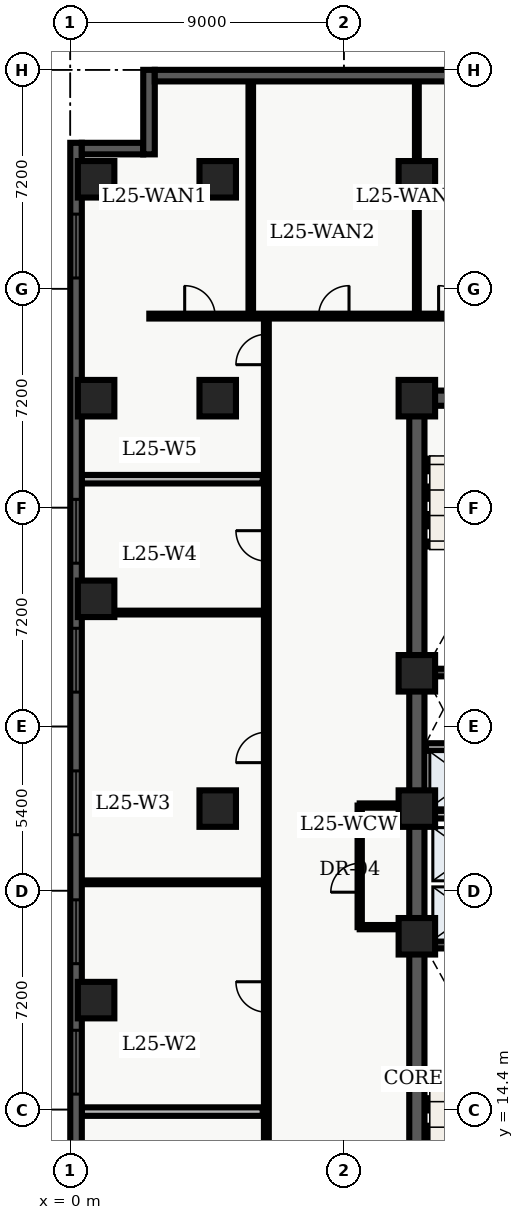
"""IFC4 building model, lengths in metres.
Left out: names, types, materials, properties, quantities, classifications, styles, units other than length and angle.
Written with IfcOpenShell. Run it as: python <this file> out.ifc"""

import sys

from ifc_helpers import new_model, entity, si_unit, converted_unit, direction, frame, origin_with_axes, origin_2d_with_axis, place, context, subcontext, project, spatial, polyline, rectangle, outline, extrude, element, fill, save


model = new_model("IFC4")
c1 = context("Model", 3, precision=1e-05, world=origin_with_axes(), true_north=direction((0.0, 1.0)))
c2 = subcontext(c1, "Body", "Model", "MODEL_VIEW")
j1 = project(units=[si_unit("LENGTHUNIT", "METRE"), converted_unit("PLANEANGLEUNIT", "DEGREE", entity("IfcPlaneAngleMeasure", 0.017), si_unit("PLANEANGLEUNIT", "RADIAN"), dimensions=[0, 0, 0, 0, 0, 0, 0])], contexts=[c1])
p1 = place(None, origin_with_axes())
s1 = spatial("IfcSite", under=j1, at=p1, CompositionType="ELEMENT")
p2 = place(p1, origin_with_axes())
s2 = spatial("IfcBuilding", under=s1, at=p2, CompositionType="ELEMENT")
p3 = place(p2, frame((0.0, 0.0, 104.7), z_axis=(0.0, 0.0, 1.0), x_axis=(1.0, 0.0, 0.0)))
s3 = spatial("IfcBuildingStorey", under=s2, at=p3, CompositionType="ELEMENT", Elevation=104.7)
p4 = place(p3, frame((11.4, 10.8, 0.0), z_axis=(0.0, 0.0, 1.0), x_axis=(0.0, 1.0, 0.0)))
e1 = element("IfcWall", 1, at=p4, inside=s3, PredefinedType="SHEAR", context=c2, shape_type="SweptSolid", body=[
    extrude(outline(polyline([(0.0, -0.25), (27.0, -0.25), (27.0, 0.25), (0.0, 0.25), (0.0, -0.25)])), origin_with_axes(), (0.0, 0.0, 1.0), 3.66),
])
p5 = place(p3, frame((11.4, 37.8, 0.0), z_axis=(0.0, 0.0, 1.0), x_axis=(1.0, 0.0, 0.0)))
e2 = element("IfcWall", 2, at=p5, inside=s3, PredefinedType="SHEAR", context=c2, shape_type="SweptSolid", body=[
    extrude(outline(polyline([(0.0, -0.25), (7.2, -0.25), (7.2, 0.25), (0.0, 0.25), (0.0, -0.25)])), origin_with_axes(), (0.0, 0.0, 1.0), 3.66),
])
p6 = place(p5, frame((2.625, 0.0, 0.0), z_axis=(0.0, 0.0, 1.0), x_axis=(1.0, 0.0, 0.0)))
e3 = element("IfcOpeningElement", 3, at=p6, cuts=e2, PredefinedType="OPENING", context=c2, shape_type="SweptSolid", body=[
    extrude(rectangle(XDim=1.05, YDim=0.52, at=origin_2d_with_axis()), origin_with_axes(), (0.0, 0.0, 1.0), 2.15),
])
for number, where, z_axis, x_axis in (
    (4, (11.65, 19.825, 0.0), (0.0, 0.0, 1.0), (1.0, 0.0, 0.0)),
    (5, (11.65, 28.775, 0.0), (0.0, 0.0, 1.0), (1.0, 0.0, 0.0)),
):
    element("IfcWall", number, at=place(p3, frame(where, z_axis=z_axis, x_axis=x_axis)), inside=s3, PredefinedType="SHEAR", context=c2, shape_type="SweptSolid", body=[
        extrude(outline(polyline([(0.0, -0.125), (6.7, -0.125), (6.7, 0.125), (0.0, 0.125), (0.0, -0.125)])), origin_with_axes(), (0.0, 0.0, 1.0), 3.66),
    ])
p7 = place(p3, frame((11.7, 24.1, 0.0), z_axis=(0.0, 0.0, 1.0), x_axis=(1.0, 0.0, 0.0)))
e6 = element("IfcWall", 6, at=p7, inside=s3, PredefinedType="SOLIDWALL", context=c2, shape_type="SweptSolid", body=[
    extrude(outline(polyline([(0.0, -0.125), (6.6, -0.125), (6.6, 0.125), (0.0, 0.125), (0.0, -0.125)])), origin_with_axes(), (0.0, 0.0, 1.0), 2.7),
])
p8 = place(p7, frame((3.75, 0.0, 0.0), z_axis=(0.0, 0.0, 1.0), x_axis=(1.0, 0.0, 0.0)))
e7 = element("IfcOpeningElement", 7, at=p8, cuts=e6, PredefinedType="OPENING", context=c2, shape_type="SweptSolid", body=[
    extrude(rectangle(XDim=0.9, YDim=0.27, at=origin_2d_with_axis()), origin_with_axes(), (0.0, 0.0, 1.0), 2.15),
])
p9 = place(p3, frame((11.7, 26.325, 0.0), z_axis=(0.0, 0.0, 1.0), x_axis=(1.0, 0.0, 0.0)))
e8 = element("IfcWall", 8, at=p9, inside=s3, PredefinedType="SOLIDWALL", context=c2, shape_type="SweptSolid", body=[
    extrude(outline(polyline([(0.0, -0.125), (6.6, -0.125), (6.6, 0.125), (0.0, 0.125), (0.0, -0.125)])), origin_with_axes(), (0.0, 0.0, 1.0), 2.7),
])
p10 = place(p9, frame((3.5, 0.0, 0.0), z_axis=(0.0, 0.0, 1.0), x_axis=(1.0, 0.0, 0.0)))
e9 = element("IfcOpeningElement", 9, at=p10, cuts=e8, PredefinedType="OPENING", context=c2, shape_type="SweptSolid", body=[
    extrude(rectangle(XDim=0.9, YDim=0.27, at=origin_2d_with_axis()), origin_with_axes(), (0.0, 0.0, 1.0), 2.15),
])
for number, where, z_axis, x_axis in (
    (10, (11.4, 20.1, 0.0), (0.0, 0.0, 1.0), (1.0, 0.0, 0.0)),
    (11, (11.4, 24.3, 0.0), (0.0, 0.0, 1.0), (1.0, 0.0, 0.0)),
    (12, (11.4, 28.75, 0.0), (0.0, 0.0, 1.0), (1.0, 0.0, 0.0)),
    (13, (11.4, 37.8, 0.0), (0.0, 0.0, 1.0), (1.0, 0.0, 0.0)),
    (14, (11.4, 45.0, 0.0), (0.0, 0.0, 1.0), (1.0, 0.0, 0.0)),
    (15, (4.85, 24.3, 0.0), (0.0, 0.0, 1.0), (1.0, 0.0, 0.0)),
    (16, (4.85, 37.8, 0.0), (0.0, 0.0, 1.0), (1.0, 0.0, 0.0)),
    (17, (4.85, 45.0, 0.0), (0.0, 0.0, 1.0), (1.0, 0.0, 0.0)),
    (18, (0.85, 18.0, 0.0), (0.0, 0.0, 1.0), (1.0, 0.0, 0.0)),
    (19, (0.85, 31.2, 0.0), (0.0, 0.0, 1.0), (1.0, 0.0, 0.0)),
    (20, (0.85, 37.8, 0.0), (0.0, 0.0, 1.0), (1.0, 0.0, 0.0)),
    (21, (0.85, 45.0, 0.0), (0.0, 0.0, 1.0), (1.0, 0.0, 0.0)),
):
    element("IfcColumn", number, at=place(p3, frame(where, z_axis=z_axis, x_axis=x_axis)), inside=s3, PredefinedType="COLUMN", context=c2, shape_type="SweptSolid", body=[
        extrude(rectangle(XDim=1.2, YDim=1.2, at=origin_2d_with_axis()), origin_with_axes(), (0.0, 0.0, 1.0), 3.9),
    ])
p11 = place(p3, frame((9.52, 20.4, 0.0), z_axis=(0.0, 0.0, 1.0), x_axis=(0.0, 1.0, 0.0)))
e22 = element("IfcWall", 22, at=p11, inside=s3, PredefinedType="PARTITIONING", context=c2, shape_type="SweptSolid", body=[
    extrude(outline(polyline([(0.0, -0.07), (4.0, -0.07), (4.0, 0.07), (0.0, 0.07), (0.0, -0.07)])), origin_with_axes(), (0.0, 0.0, 1.0), 2.7),
])
p12 = place(p11, frame((1.625, 0.0, 0.0), z_axis=(0.0, 0.0, 1.0), x_axis=(1.0, 0.0, 0.0)))
e23 = element("IfcOpeningElement", 23, at=p12, cuts=e22, PredefinedType="OPENING", context=c2, shape_type="SweptSolid", body=[
    extrude(rectangle(XDim=0.95, YDim=0.16, at=origin_2d_with_axis()), origin_with_axes(), (0.0, 0.0, 1.0), 2.15),
])
for number, where, z_axis, x_axis in (
    (24, (9.52, 20.4, 0.0), (0.0, 0.0, 1.0), (1.0, 0.0, 0.0)),
    (25, (9.52, 24.4, 0.0), (0.0, 0.0, 1.0), (1.0, 0.0, 0.0)),
):
    element("IfcWall", number, at=place(p3, frame(where, z_axis=z_axis, x_axis=x_axis)), inside=s3, PredefinedType="PARTITIONING", context=c2, shape_type="SweptSolid", body=[
        extrude(outline(polyline([(0.0, -0.07), (1.58, -0.07), (1.58, 0.07), (0.0, 0.07), (0.0, -0.07)])), origin_with_axes(), (0.0, 0.0, 1.0), 2.7),
    ])
p13 = place(p3, frame((2.6, 40.5, 0.0), z_axis=(0.0, 0.0, 1.0), x_axis=(1.0, 0.0, 0.0)))
e26 = element("IfcWall", 26, at=p13, inside=s3, PredefinedType="PARTITIONING", context=c2, shape_type="SweptSolid", body=[
    extrude(outline(polyline([(0.0, -0.08), (18.65, -0.08), (18.65, 0.08), (0.0, 0.08), (0.0, -0.08)])), origin_with_axes(), (0.0, 0.0, 1.0), 2.7),
])
p14 = place(p13, frame((1.663, 0.0, 0.0), z_axis=(0.0, 0.0, 1.0), x_axis=(1.0, 0.0, 0.0)))
e27 = element("IfcOpeningElement", 27, at=p14, cuts=e26, PredefinedType="OPENING", context=c2, shape_type="SweptSolid", body=[
    extrude(rectangle(XDim=1.0, YDim=0.18, at=origin_2d_with_axis()), origin_with_axes(), (0.0, 0.0, 1.0), 2.15),
])
p15 = place(p13, frame((6.069, 0.0, 0.0), z_axis=(0.0, 0.0, 1.0), x_axis=(1.0, 0.0, 0.0)))
e28 = element("IfcOpeningElement", 28, at=p15, cuts=e26, PredefinedType="OPENING", context=c2, shape_type="SweptSolid", body=[
    extrude(rectangle(XDim=1.0, YDim=0.18, at=origin_2d_with_axis()), origin_with_axes(), (0.0, 0.0, 1.0), 2.15),
])
p16 = place(p13, frame((10.015, 0.0, 0.0), z_axis=(0.0, 0.0, 1.0), x_axis=(1.0, 0.0, 0.0)))
e29 = element("IfcOpeningElement", 29, at=p16, cuts=e26, PredefinedType="OPENING", context=c2, shape_type="SweptSolid", body=[
    extrude(rectangle(XDim=1.0, YDim=0.18, at=origin_2d_with_axis()), origin_with_axes(), (0.0, 0.0, 1.0), 2.15),
])
p17 = place(p13, frame((13.825, 0.0, 0.0), z_axis=(0.0, 0.0, 1.0), x_axis=(1.0, 0.0, 0.0)))
e30 = element("IfcOpeningElement", 30, at=p17, cuts=e26, PredefinedType="OPENING", context=c2, shape_type="SweptSolid", body=[
    extrude(rectangle(XDim=1.0, YDim=0.18, at=origin_2d_with_axis()), origin_with_axes(), (0.0, 0.0, 1.0), 2.15),
])
p18 = place(p3, frame((6.45, 7.8, 0.0), z_axis=(0.0, 0.0, 1.0), x_axis=(0.0, 1.0, 0.0)))
e31 = element("IfcWall", 31, at=p18, inside=s3, PredefinedType="PARTITIONING", context=c2, shape_type="SweptSolid", body=[
    extrude(outline(polyline([(0.0, -0.08), (32.7, -0.08), (32.7, 0.08), (0.0, 0.08), (0.0, -0.08)])), origin_with_axes(), (0.0, 0.0, 1.0), 2.7),
])
p19 = place(p18, frame((4.582, 0.0, 0.0), z_axis=(0.0, 0.0, 1.0), x_axis=(1.0, 0.0, 0.0)))
e32 = element("IfcOpeningElement", 32, at=p19, cuts=e31, PredefinedType="OPENING", context=c2, shape_type="SweptSolid", body=[
    extrude(rectangle(XDim=1.0, YDim=0.18, at=origin_2d_with_axis()), origin_with_axes(), (0.0, 0.0, 1.0), 2.15),
])
p20 = place(p18, frame((10.304, 0.0, 0.0), z_axis=(0.0, 0.0, 1.0), x_axis=(1.0, 0.0, 0.0)))
e33 = element("IfcOpeningElement", 33, at=p20, cuts=e31, PredefinedType="OPENING", context=c2, shape_type="SweptSolid", body=[
    extrude(rectangle(XDim=1.0, YDim=0.18, at=origin_2d_with_axis()), origin_with_axes(), (0.0, 0.0, 1.0), 2.15),
])
p21 = place(p18, frame((18.512, 0.0, 0.0), z_axis=(0.0, 0.0, 1.0), x_axis=(1.0, 0.0, 0.0)))
e34 = element("IfcOpeningElement", 34, at=p21, cuts=e31, PredefinedType="OPENING", context=c2, shape_type="SweptSolid", body=[
    extrude(rectangle(XDim=1.0, YDim=0.18, at=origin_2d_with_axis()), origin_with_axes(), (0.0, 0.0, 1.0), 2.15),
])
p22 = place(p18, frame((25.142, 0.0, 0.0), z_axis=(0.0, 0.0, 1.0), x_axis=(1.0, 0.0, 0.0)))
e35 = element("IfcOpeningElement", 35, at=p22, cuts=e31, PredefinedType="OPENING", context=c2, shape_type="SweptSolid", body=[
    extrude(rectangle(XDim=1.0, YDim=0.18, at=origin_2d_with_axis()), origin_with_axes(), (0.0, 0.0, 1.0), 2.15),
])
p23 = place(p18, frame((31.602, 0.0, 0.0), z_axis=(0.0, 0.0, 1.0), x_axis=(1.0, 0.0, 0.0)))
e36 = element("IfcOpeningElement", 36, at=p23, cuts=e31, PredefinedType="OPENING", context=c2, shape_type="SweptSolid", body=[
    extrude(rectangle(XDim=1.0, YDim=0.18, at=origin_2d_with_axis()), origin_with_axes(), (0.0, 0.0, 1.0), 2.15),
])
p24 = place(p3, frame((0.375, 14.333, 0.0), z_axis=(0.0, 0.0, 1.0), x_axis=(1.0, 0.0, 0.0)))
e37 = element("IfcWall", 37, at=p24, inside=s3, PredefinedType="PARTITIONING", context=c2, shape_type="SweptSolid", body=[
    extrude(outline(polyline([(0.0, -0.14), (5.955, -0.14), (5.955, 0.14), (0.0, 0.14), (0.0, -0.14)])), origin_with_axes(), (0.0, 0.0, 1.0), 2.7),
])
for number, where, z_axis, x_axis in (
    (38, (0.375, 21.875, 0.0), (0.0, 0.0, 1.0), (1.0, 0.0, 0.0)),
    (39, (0.375, 30.748, 0.0), (0.0, 0.0, 1.0), (1.0, 0.0, 0.0)),
):
    element("IfcWall", number, at=place(p3, frame(where, z_axis=z_axis, x_axis=x_axis)), inside=s3, PredefinedType="PARTITIONING", context=c2, shape_type="SweptSolid", body=[
        extrude(outline(polyline([(0.0, -0.062), (5.955, -0.062), (5.955, 0.062), (0.0, 0.062), (0.0, -0.062)])), origin_with_axes(), (0.0, 0.0, 1.0), 2.7),
    ])
p25 = place(p3, frame((0.375, 35.135, 0.0), z_axis=(0.0, 0.0, 1.0), x_axis=(1.0, 0.0, 0.0)))
e40 = element("IfcWall", 40, at=p25, inside=s3, PredefinedType="PARTITIONING", context=c2, shape_type="SweptSolid", body=[
    extrude(outline(polyline([(0.0, -0.14), (5.955, -0.14), (5.955, 0.14), (0.0, 0.14), (0.0, -0.14)])), origin_with_axes(), (0.0, 0.0, 1.0), 2.7),
])
p26 = place(p3, frame((5.937, 40.6, 0.0), z_axis=(0.0, 0.0, 1.0), x_axis=(0.0, 1.0, 0.0)))
e41 = element("IfcWall", 41, at=p26, inside=s3, PredefinedType="PARTITIONING", context=c2, shape_type="SweptSolid", body=[
    extrude(outline(polyline([(0.0, -0.075), (7.64, -0.075), (7.64, 0.075), (0.0, 0.075), (0.0, -0.075)])), origin_with_axes(), (0.0, 0.0, 1.0), 2.7),
])
p27 = place(p3, frame((11.4, 40.6, 0.0), z_axis=(0.0, 0.0, 1.0), x_axis=(0.0, 1.0, 0.0)))
e42 = element("IfcWall", 42, at=p27, inside=s3, PredefinedType="PARTITIONING", context=c2, shape_type="SweptSolid", body=[
    extrude(outline(polyline([(0.0, -0.062), (7.64, -0.062), (7.64, 0.062), (0.0, 0.062), (0.0, -0.062)])), origin_with_axes(), (0.0, 0.0, 1.0), 2.7),
])
p28 = place(p3, frame((0.19, 2.78, 0.0), z_axis=(0.0, 0.0, 1.0), x_axis=(0.0, 1.0, 0.0)))
e43 = element("IfcWall", 43, at=p28, inside=s3, PredefinedType="SOLIDWALL", context=c2, shape_type="SweptSolid", body=[
    extrude(outline(polyline([(0.0, -0.19), (43.42, -0.19), (43.42, 0.19), (0.0, 0.19), (0.0, -0.19)])), origin_with_axes(), (0.0, 0.0, 1.0), 3.66),
])
p29 = place(p28, frame((2.946, 0.0, 0.45), z_axis=(0.0, 0.0, 1.0), x_axis=(1.0, 0.0, 0.0)))
e44 = element("IfcOpeningElement", 44, at=p29, cuts=e43, PredefinedType="OPENING", context=c2, shape_type="SweptSolid", body=[
    extrude(rectangle(XDim=2.1, YDim=0.4, at=origin_2d_with_axis()), origin_with_axes(), (0.0, 0.0, 1.0), 2.2),
])
p30 = place(p28, frame((13.178, 0.0, 0.45), z_axis=(0.0, 0.0, 1.0), x_axis=(1.0, 0.0, 0.0)))
e45 = element("IfcOpeningElement", 45, at=p30, cuts=e43, PredefinedType="OPENING", context=c2, shape_type="SweptSolid", body=[
    extrude(rectangle(XDim=2.1, YDim=0.4, at=origin_2d_with_axis()), origin_with_axes(), (0.0, 0.0, 1.0), 2.2),
])
p31 = place(p28, frame((17.469, 0.0, 0.45), z_axis=(0.0, 0.0, 1.0), x_axis=(1.0, 0.0, 0.0)))
e46 = element("IfcOpeningElement", 46, at=p31, cuts=e43, PredefinedType="OPENING", context=c2, shape_type="SweptSolid", body=[
    extrude(rectangle(XDim=2.1, YDim=0.4, at=origin_2d_with_axis()), origin_with_axes(), (0.0, 0.0, 1.0), 2.2),
])
p32 = place(p28, frame((21.71, 0.0, 0.45), z_axis=(0.0, 0.0, 1.0), x_axis=(1.0, 0.0, 0.0)))
e47 = element("IfcOpeningElement", 47, at=p32, cuts=e43, PredefinedType="OPENING", context=c2, shape_type="SweptSolid", body=[
    extrude(rectangle(XDim=2.1, YDim=0.4, at=origin_2d_with_axis()), origin_with_axes(), (0.0, 0.0, 1.0), 2.2),
])
p33 = place(p28, frame((26.401, 0.0, 0.45), z_axis=(0.0, 0.0, 1.0), x_axis=(1.0, 0.0, 0.0)))
e48 = element("IfcOpeningElement", 48, at=p33, cuts=e43, PredefinedType="OPENING", context=c2, shape_type="SweptSolid", body=[
    extrude(rectangle(XDim=2.1, YDim=0.4, at=origin_2d_with_axis()), origin_with_axes(), (0.0, 0.0, 1.0), 2.2),
])
p34 = place(p28, frame((30.642, 0.0, 0.45), z_axis=(0.0, 0.0, 1.0), x_axis=(1.0, 0.0, 0.0)))
e49 = element("IfcOpeningElement", 49, at=p34, cuts=e43, PredefinedType="OPENING", context=c2, shape_type="SweptSolid", body=[
    extrude(rectangle(XDim=2.1, YDim=0.4, at=origin_2d_with_axis()), origin_with_axes(), (0.0, 0.0, 1.0), 2.2),
])
p35 = place(p28, frame((40.024, 0.0, 0.45), z_axis=(0.0, 0.0, 1.0), x_axis=(1.0, 0.0, 0.0)))
e50 = element("IfcOpeningElement", 50, at=p35, cuts=e43, PredefinedType="OPENING", context=c2, shape_type="SweptSolid", body=[
    extrude(rectangle(XDim=2.1, YDim=0.4, at=origin_2d_with_axis()), origin_with_axes(), (0.0, 0.0, 1.0), 2.2),
])
p36 = place(p3, frame((0.38, 46.01, 0.0), z_axis=(0.0, 0.0, 1.0), x_axis=(1.0, 0.0, 0.0)))
e51 = element("IfcWall", 51, at=p36, inside=s3, PredefinedType="SOLIDWALL", context=c2, shape_type="SweptSolid", body=[
    extrude(outline(polyline([(0.0, -0.19), (2.02, -0.19), (2.02, 0.19), (0.0, 0.19), (0.0, -0.19)])), origin_with_axes(), (0.0, 0.0, 1.0), 3.66),
])
p37 = place(p3, frame((2.59, 45.82, 0.0), z_axis=(0.0, 0.0, 1.0), x_axis=(0.0, 1.0, 0.0)))
e52 = element("IfcWall", 52, at=p37, inside=s3, PredefinedType="SOLIDWALL", context=c2, shape_type="SweptSolid", body=[
    extrude(outline(polyline([(0.0, -0.19), (2.78, -0.19), (2.78, 0.19), (0.0, 0.19), (0.0, -0.19)])), origin_with_axes(), (0.0, 0.0, 1.0), 3.66),
])
p38 = place(p3, frame((2.78, 48.41, 0.0), z_axis=(0.0, 0.0, 1.0), x_axis=(1.0, 0.0, 0.0)))
e53 = element("IfcWall", 53, at=p38, inside=s3, PredefinedType="SOLIDWALL", context=c2, shape_type="SweptSolid", body=[
    extrude(outline(polyline([(0.0, -0.19), (16.42, -0.19), (16.42, 0.19), (0.0, 0.19), (0.0, -0.19)])), origin_with_axes(), (0.0, 0.0, 1.0), 3.66),
])
p39 = place(p38, frame((13.283, 0.0, 0.45), z_axis=(0.0, 0.0, 1.0), x_axis=(1.0, 0.0, 0.0)))
e54 = element("IfcOpeningElement", 54, at=p39, cuts=e53, PredefinedType="OPENING", context=c2, shape_type="SweptSolid", body=[
    extrude(rectangle(XDim=2.1, YDim=0.4, at=origin_2d_with_axis()), origin_with_axes(), (0.0, 0.0, 1.0), 2.2),
])
p40 = place(p11, frame((1.625, 0.0, 0.0), z_axis=(0.0, 0.0, 1.0), x_axis=(1.0, 0.0, 0.0)))
e55 = element("IfcDoor", 55, at=p40, inside=s3, OperationType="SINGLE_SWING_LEFT", PredefinedType="DOOR", context=c2, shape_type="SweptSolid", body=[
    extrude(rectangle(XDim=0.95, YDim=0.084, at=origin_2d_with_axis()), origin_with_axes(), (0.0, 0.0, 1.0), 2.15),
])
fill(e23, e55)
p41 = place(p18, frame((10.304, 0.0, 0.0), z_axis=(0.0, 0.0, 1.0), x_axis=(1.0, 0.0, 0.0)))
e56 = element("IfcDoor", 56, at=p41, inside=s3, OperationType="SINGLE_SWING_RIGHT", PredefinedType="DOOR", context=c2, shape_type="SweptSolid", body=[
    extrude(rectangle(XDim=1.0, YDim=0.09, at=origin_2d_with_axis()), origin_with_axes(), (0.0, 0.0, 1.0), 2.15),
])
fill(e33, e56)
p42 = place(p18, frame((18.512, 0.0, 0.0), z_axis=(0.0, 0.0, 1.0), x_axis=(1.0, 0.0, 0.0)))
e57 = element("IfcDoor", 57, at=p42, inside=s3, OperationType="SINGLE_SWING_LEFT", PredefinedType="DOOR", context=c2, shape_type="SweptSolid", body=[
    extrude(rectangle(XDim=1.0, YDim=0.09, at=origin_2d_with_axis()), origin_with_axes(), (0.0, 0.0, 1.0), 2.15),
])
fill(e34, e57)
p43 = place(p18, frame((25.142, 0.0, 0.0), z_axis=(0.0, 0.0, 1.0), x_axis=(1.0, 0.0, 0.0)))
e58 = element("IfcDoor", 58, at=p43, inside=s3, OperationType="SINGLE_SWING_RIGHT", PredefinedType="DOOR", context=c2, shape_type="SweptSolid", body=[
    extrude(rectangle(XDim=1.0, YDim=0.09, at=origin_2d_with_axis()), origin_with_axes(), (0.0, 0.0, 1.0), 2.15),
])
fill(e35, e58)
p44 = place(p18, frame((31.602, 0.0, 0.0), z_axis=(0.0, 0.0, 1.0), x_axis=(1.0, 0.0, 0.0)))
e59 = element("IfcDoor", 59, at=p44, inside=s3, OperationType="SINGLE_SWING_LEFT", PredefinedType="DOOR", context=c2, shape_type="SweptSolid", body=[
    extrude(rectangle(XDim=1.0, YDim=0.09, at=origin_2d_with_axis()), origin_with_axes(), (0.0, 0.0, 1.0), 2.15),
])
fill(e36, e59)
p45 = place(p13, frame((1.663, 0.0, 0.0), z_axis=(0.0, 0.0, 1.0), x_axis=(1.0, 0.0, 0.0)))
e60 = element("IfcDoor", 60, at=p45, inside=s3, OperationType="SINGLE_SWING_LEFT", PredefinedType="DOOR", context=c2, shape_type="SweptSolid", body=[
    extrude(rectangle(XDim=1.0, YDim=0.09, at=origin_2d_with_axis()), origin_with_axes(), (0.0, 0.0, 1.0), 2.15),
])
fill(e27, e60)
p46 = place(p13, frame((6.069, 0.0, 0.0), z_axis=(0.0, 0.0, 1.0), x_axis=(1.0, 0.0, 0.0)))
e61 = element("IfcDoor", 61, at=p46, inside=s3, OperationType="SINGLE_SWING_RIGHT", PredefinedType="DOOR", context=c2, shape_type="SweptSolid", body=[
    extrude(rectangle(XDim=1.0, YDim=0.09, at=origin_2d_with_axis()), origin_with_axes(), (0.0, 0.0, 1.0), 2.15),
])
fill(e28, e61)
p47 = place(p13, frame((10.015, 0.0, 0.0), z_axis=(0.0, 0.0, 1.0), x_axis=(1.0, 0.0, 0.0)))
e62 = element("IfcDoor", 62, at=p47, inside=s3, OperationType="SINGLE_SWING_LEFT", PredefinedType="DOOR", context=c2, shape_type="SweptSolid", body=[
    extrude(rectangle(XDim=1.0, YDim=0.09, at=origin_2d_with_axis()), origin_with_axes(), (0.0, 0.0, 1.0), 2.15),
])
fill(e29, e62)
p48 = place(p28, frame((13.178, 0.0, 0.45), z_axis=(0.0, 0.0, 1.0), x_axis=(1.0, 0.0, 0.0)))
e63 = element("IfcWindow", 63, at=p48, inside=s3, PredefinedType="WINDOW", context=c2, shape_type="SweptSolid", body=[
    extrude(rectangle(XDim=2.1, YDim=0.09, at=origin_2d_with_axis()), origin_with_axes(), (0.0, 0.0, 1.0), 2.2),
])
fill(e45, e63)
p49 = place(p28, frame((17.469, 0.0, 0.45), z_axis=(0.0, 0.0, 1.0), x_axis=(1.0, 0.0, 0.0)))
e64 = element("IfcWindow", 64, at=p49, inside=s3, PredefinedType="WINDOW", context=c2, shape_type="SweptSolid", body=[
    extrude(rectangle(XDim=2.1, YDim=0.09, at=origin_2d_with_axis()), origin_with_axes(), (0.0, 0.0, 1.0), 2.2),
])
fill(e46, e64)
p50 = place(p28, frame((21.71, 0.0, 0.45), z_axis=(0.0, 0.0, 1.0), x_axis=(1.0, 0.0, 0.0)))
e65 = element("IfcWindow", 65, at=p50, inside=s3, PredefinedType="WINDOW", context=c2, shape_type="SweptSolid", body=[
    extrude(rectangle(XDim=2.1, YDim=0.09, at=origin_2d_with_axis()), origin_with_axes(), (0.0, 0.0, 1.0), 2.2),
])
fill(e47, e65)
p51 = place(p28, frame((26.401, 0.0, 0.45), z_axis=(0.0, 0.0, 1.0), x_axis=(1.0, 0.0, 0.0)))
e66 = element("IfcWindow", 66, at=p51, inside=s3, PredefinedType="WINDOW", context=c2, shape_type="SweptSolid", body=[
    extrude(rectangle(XDim=2.1, YDim=0.09, at=origin_2d_with_axis()), origin_with_axes(), (0.0, 0.0, 1.0), 2.2),
])
fill(e48, e66)
p52 = place(p28, frame((30.642, 0.0, 0.45), z_axis=(0.0, 0.0, 1.0), x_axis=(1.0, 0.0, 0.0)))
e67 = element("IfcWindow", 67, at=p52, inside=s3, PredefinedType="WINDOW", context=c2, shape_type="SweptSolid", body=[
    extrude(rectangle(XDim=2.1, YDim=0.09, at=origin_2d_with_axis()), origin_with_axes(), (0.0, 0.0, 1.0), 2.2),
])
fill(e49, e67)
p53 = place(p28, frame((40.024, 0.0, 0.45), z_axis=(0.0, 0.0, 1.0), x_axis=(1.0, 0.0, 0.0)))
e68 = element("IfcWindow", 68, at=p53, inside=s3, PredefinedType="WINDOW", context=c2, shape_type="SweptSolid", body=[
    extrude(rectangle(XDim=2.1, YDim=0.09, at=origin_2d_with_axis()), origin_with_axes(), (0.0, 0.0, 1.0), 2.2),
])
fill(e50, e68)
save(model, sys.argv[1])
